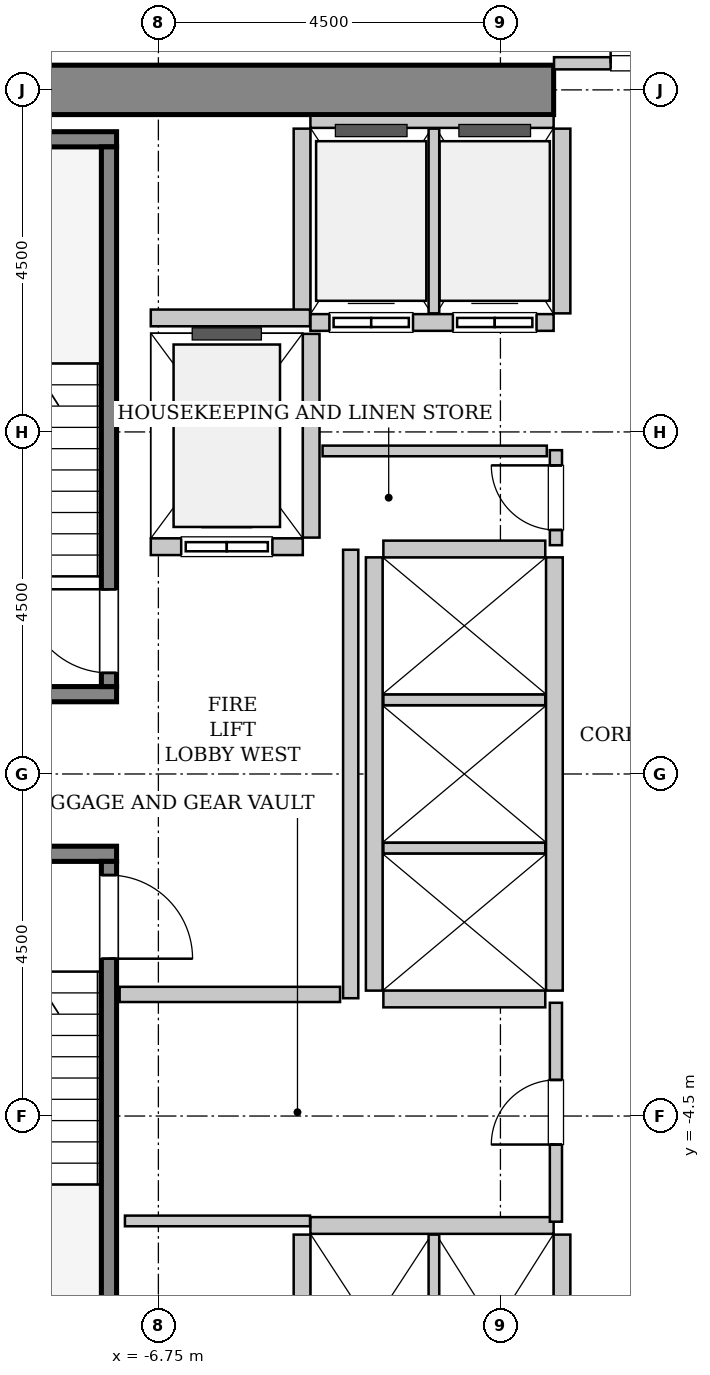
"""IFC4 building model, lengths in metres.
Left out: names, types, materials, properties, quantities, classifications, styles, units other than length and angle.
Written with IfcOpenShell. Run it as: python <this file> out.ifc"""

import sys

from ifc_helpers import new_model, si_unit, direction, frame, frame_2d, origin, place, context, subcontext, project, spatial, rectangle, extrude, source, transform, mapped, element, fill, save


model = new_model("IFC4")
c1 = context("Model", 3, precision=1e-05, world=origin(), true_north=direction((0.0, 1.0)))
c2 = subcontext(c1, "Body", "Model", "MODEL_VIEW")
j1 = project(units=[si_unit("LENGTHUNIT", "METRE"), si_unit("PLANEANGLEUNIT", "RADIAN")], contexts=[c1])
p1 = place(None, origin())
s1 = spatial("IfcSite", under=j1, at=p1, CompositionType="ELEMENT")
p2 = place(p1, origin())
s2 = spatial("IfcBuilding", under=s1, at=p2, CompositionType="ELEMENT")
p3 = place(p2, frame((0.0, 0.0, 33.0)))
s3 = spatial("IfcBuildingStorey", under=s2, at=p3, CompositionType="ELEMENT", Elevation=33.0)
m1 = source(origin(), c2, "Body", "SweptSolid", [
    extrude(rectangle(XDim=10.025, YDim=0.65, at=frame_2d((5.012, 0.0))), origin(), (0.0, 0.0, 1.0), 3.8),
])
p4 = place(p3, frame((-11.575, 9.0, 0.0), z_axis=(0.0, 0.0, 1.0), x_axis=(1.0, 0.0, 0.0)))
e1 = element("IfcWall", 1, at=p4, inside=s3, PredefinedType="SHEAR", context=c2, shape_type="MappedRepresentation", body=[
    mapped(m1, transform((0.0, 0.0, 0.0), x_axis=(1.0, 0.0, 0.0), y_axis=(0.0, 1.0, 0.0), z_axis=(0.0, 0.0, 1.0), scale=1.0)),
])
m2 = source(origin(), c2, "Body", "SweptSolid", [
    extrude(rectangle(XDim=3.4, YDim=0.2, at=frame_2d((1.7, 0.0))), origin(), (0.0, 0.0, 1.0), 3.8),
])
p5 = place(p3, frame((-7.3, 1.05, 0.0), z_axis=(0.0, 0.0, 1.0), x_axis=(-1.0, 0.0, 0.0)))
e2 = element("IfcWall", 2, at=p5, inside=s3, PredefinedType="SOLIDWALL", context=c2, shape_type="MappedRepresentation", body=[
    mapped(m2, transform((0.0, 0.0, 0.0), x_axis=(1.0, 0.0, 0.0), y_axis=(0.0, 1.0, 0.0), z_axis=(0.0, 0.0, 1.0), scale=1.0)),
])
m3 = source(origin(), c2, "Body", "SweptSolid", [
    extrude(rectangle(XDim=3.63, YDim=0.2, at=frame_2d((1.815, 0.0))), origin(), (0.0, 0.0, 1.0), 3.8),
])
p6 = place(p3, frame((-7.3, 8.35, 0.0), z_axis=(0.0, 0.0, 1.0), x_axis=(-1.0, 0.0, 0.0)))
e3 = element("IfcWall", 3, at=p6, inside=s3, PredefinedType="SOLIDWALL", context=c2, shape_type="MappedRepresentation", body=[
    mapped(m3, transform((0.0, 0.0, 0.0), x_axis=(1.0, 0.0, 0.0), y_axis=(0.0, 1.0, 0.0), z_axis=(0.0, 0.0, 1.0), scale=1.0)),
])
m4 = source(origin(), c2, "Body", "SweptSolid", [
    extrude(rectangle(XDim=7.1, YDim=0.2, at=frame_2d((3.55, 0.0))), origin(), (0.0, 0.0, 1.0), 3.8),
])
p7 = place(p3, frame((-7.4, 1.15, 0.0), z_axis=(0.0, 0.0, 1.0), x_axis=(0.0, 1.0, 0.0)))
e4 = element("IfcWall", 4, at=p7, inside=s3, PredefinedType="SOLIDWALL", context=c2, shape_type="MappedRepresentation", body=[
    mapped(m4, transform((0.0, 0.0, 0.0), x_axis=(1.0, 0.0, 0.0), y_axis=(0.0, 1.0, 0.0), z_axis=(0.0, 0.0, 1.0), scale=1.0)),
])
p8 = place(p7, frame((0.18, 0.0, 0.0)))
e5 = element("IfcOpeningElement", 5, at=p8, cuts=e4, PredefinedType="OPENING", context=c2, shape_type="SweptSolid", body=[
    extrude(rectangle(XDim=1.1, YDim=2.15, at=frame_2d((0.55, 1.075))), frame((0.0, 0.11, 0.0), z_axis=(0.0, -1.0, 0.0), x_axis=(1.0, 0.0, 0.0)), (0.0, 0.0, 1.0), 0.22),
])
p9 = place(p3, frame((-10.7, -1.05, 0.0), z_axis=(0.0, 0.0, 1.0), x_axis=(1.0, 0.0, 0.0)))
e6 = element("IfcWall", 6, at=p9, inside=s3, PredefinedType="SOLIDWALL", context=c2, shape_type="MappedRepresentation", body=[
    mapped(m2, transform((0.0, 0.0, 0.0), x_axis=(1.0, 0.0, 0.0), y_axis=(0.0, 1.0, 0.0), z_axis=(0.0, 0.0, 1.0), scale=1.0)),
])
p10 = place(p3, frame((-7.4, -1.15, 0.0), z_axis=(0.0, 0.0, 1.0), x_axis=(0.0, -1.0, 0.0)))
e7 = element("IfcWall", 7, at=p10, inside=s3, PredefinedType="SOLIDWALL", context=c2, shape_type="MappedRepresentation", body=[
    mapped(m4, transform((0.0, 0.0, 0.0), x_axis=(1.0, 0.0, 0.0), y_axis=(0.0, 1.0, 0.0), z_axis=(0.0, 0.0, 1.0), scale=1.0)),
])
p11 = place(p10, frame((0.18, 0.0, 0.0)))
e8 = element("IfcOpeningElement", 8, at=p11, cuts=e7, PredefinedType="OPENING", context=c2, shape_type="SweptSolid", body=[
    extrude(rectangle(XDim=1.1, YDim=2.15, at=frame_2d((0.55, 1.075))), frame((0.0, 0.11, 0.0), z_axis=(0.0, -1.0, 0.0), x_axis=(1.0, 0.0, 0.0)), (0.0, 0.0, 1.0), 0.22),
])
m5 = source(origin(), c2, "Body", "SweptSolid", [
    extrude(rectangle(XDim=2.0, YDim=0.22, at=frame_2d((1.0, 0.0))), origin(), (0.0, 0.0, 1.0), 3.535),
])
p12 = place(p3, frame((-6.85, 2.99, 0.0), z_axis=(0.0, 0.0, 1.0), x_axis=(1.0, 0.0, 0.0)))
e9 = element("IfcWall", 9, at=p12, inside=s3, PredefinedType="SOLIDWALL", context=c2, shape_type="MappedRepresentation", body=[
    mapped(m5, transform((0.0, 0.0, 0.0), x_axis=(1.0, 0.0, 0.0), y_axis=(0.0, 1.0, 0.0), z_axis=(0.0, 0.0, 1.0), scale=1.0)),
])
p13 = place(p12, frame((0.4, 0.0, 0.0)))
e10 = element("IfcOpeningElement", 10, at=p13, cuts=e9, PredefinedType="OPENING", context=c2, shape_type="SweptSolid", body=[
    extrude(rectangle(XDim=1.2, YDim=2.2, at=frame_2d((0.6, 1.1))), frame((0.0, 0.12, 0.0), z_axis=(0.0, -1.0, 0.0), x_axis=(1.0, 0.0, 0.0)), (0.0, 0.0, 1.0), 0.24),
])
m6 = source(origin(), c2, "Body", "SweptSolid", [
    extrude(rectangle(XDim=2.68, YDim=0.22, at=frame_2d((1.34, 0.0))), origin(), (0.0, 0.0, 1.0), 3.535),
])
p14 = place(p3, frame((-4.74, 3.11, 0.0), z_axis=(0.0, 0.0, 1.0), x_axis=(0.0, 1.0, 0.0)))
e11 = element("IfcWall", 11, at=p14, inside=s3, PredefinedType="SOLIDWALL", context=c2, shape_type="MappedRepresentation", body=[
    mapped(m6, transform((0.0, 0.0, 0.0), x_axis=(1.0, 0.0, 0.0), y_axis=(0.0, 1.0, 0.0), z_axis=(0.0, 0.0, 1.0), scale=1.0)),
])
m7 = source(origin(), c2, "Body", "SweptSolid", [
    extrude(rectangle(XDim=3.2, YDim=0.22, at=frame_2d((1.6, 0.0))), origin(), (0.0, 0.0, 1.0), 3.535),
])
p15 = place(p3, frame((-4.75, 5.94, 0.0), z_axis=(0.0, 0.0, 1.0), x_axis=(1.0, 0.0, 0.0)))
e12 = element("IfcWall", 12, at=p15, inside=s3, PredefinedType="SOLIDWALL", context=c2, shape_type="MappedRepresentation", body=[
    mapped(m7, transform((0.0, 0.0, 0.0), x_axis=(1.0, 0.0, 0.0), y_axis=(0.0, 1.0, 0.0), z_axis=(0.0, 0.0, 1.0), scale=1.0)),
])
p16 = place(p15, frame((0.25, 0.0, 0.0)))
e13 = element("IfcOpeningElement", 13, at=p16, cuts=e12, PredefinedType="OPENING", context=c2, shape_type="SweptSolid", body=[
    extrude(rectangle(XDim=1.1, YDim=2.2, at=frame_2d((0.55, 1.1))), frame((0.0, 0.12, 0.0), z_axis=(0.0, -1.0, 0.0), x_axis=(1.0, 0.0, 0.0)), (0.0, 0.0, 1.0), 0.24),
])
p17 = place(p15, frame((1.875, 0.0, 0.0)))
e14 = element("IfcOpeningElement", 14, at=p17, cuts=e12, PredefinedType="OPENING", context=c2, shape_type="SweptSolid", body=[
    extrude(rectangle(XDim=1.1, YDim=2.2, at=frame_2d((0.55, 1.1))), frame((0.0, 0.12, 0.0), z_axis=(0.0, -1.0, 0.0), x_axis=(1.0, 0.0, 0.0)), (0.0, 0.0, 1.0), 0.24),
])
m8 = source(origin(), c2, "Body", "SweptSolid", [
    extrude(rectangle(XDim=3.2, YDim=0.16, at=frame_2d((1.6, 0.0))), origin(), (0.0, 0.0, 1.0), 2.425),
])
p18 = place(p3, frame((-1.55, 8.58, 0.0), z_axis=(0.0, 0.0, 1.0), x_axis=(-1.0, 0.0, 0.0)))
e15 = element("IfcWall", 15, at=p18, inside=s3, PredefinedType="PARTITIONING", context=c2, shape_type="MappedRepresentation", body=[
    mapped(m8, transform((0.0, 0.0, 0.0), x_axis=(1.0, 0.0, 0.0), y_axis=(0.0, 1.0, 0.0), z_axis=(0.0, 0.0, 1.0), scale=1.0)),
])
m9 = source(origin(), c2, "Body", "SweptSolid", [
    extrude(rectangle(XDim=2.43, YDim=0.22, at=frame_2d((1.215, 0.0))), origin(), (0.0, 0.0, 1.0), 3.535),
])
p19 = place(p3, frame((-4.86, 8.49, 0.0), z_axis=(0.0, 0.0, 1.0), x_axis=(0.0, -1.0, 0.0)))
e16 = element("IfcWall", 16, at=p19, inside=s3, PredefinedType="SOLIDWALL", context=c2, shape_type="MappedRepresentation", body=[
    mapped(m9, transform((0.0, 0.0, 0.0), x_axis=(1.0, 0.0, 0.0), y_axis=(0.0, 1.0, 0.0), z_axis=(0.0, 0.0, 1.0), scale=1.0)),
])
m10 = source(origin(), c2, "Body", "SweptSolid", [
    extrude(rectangle(XDim=2.43, YDim=0.14, at=frame_2d((1.215, 0.0))), origin(), (0.0, 0.0, 1.0), 3.535),
])
p20 = place(p3, frame((-3.125, 6.06, 0.0), z_axis=(0.0, 0.0, 1.0), x_axis=(0.0, 1.0, 0.0)))
e17 = element("IfcWall", 17, at=p20, inside=s3, PredefinedType="PARTITIONING", context=c2, shape_type="MappedRepresentation", body=[
    mapped(m10, transform((0.0, 0.0, 0.0), x_axis=(1.0, 0.0, 0.0), y_axis=(0.0, 1.0, 0.0), z_axis=(0.0, 0.0, 1.0), scale=1.0)),
])
p21 = place(p3, frame((-1.44, 6.06, 0.0), z_axis=(0.0, 0.0, 1.0), x_axis=(0.0, 1.0, 0.0)))
e18 = element("IfcWall", 18, at=p21, inside=s3, PredefinedType="SOLIDWALL", context=c2, shape_type="MappedRepresentation", body=[
    mapped(m9, transform((0.0, 0.0, 0.0), x_axis=(1.0, 0.0, 0.0), y_axis=(0.0, 1.0, 0.0), z_axis=(0.0, 0.0, 1.0), scale=1.0)),
])
p22 = place(p3, frame((-1.55, -5.94, 0.0), z_axis=(0.0, 0.0, 1.0), x_axis=(-1.0, 0.0, 0.0)))
e19 = element("IfcWall", 19, at=p22, inside=s3, PredefinedType="SOLIDWALL", context=c2, shape_type="MappedRepresentation", body=[
    mapped(m7, transform((0.0, 0.0, 0.0), x_axis=(1.0, 0.0, 0.0), y_axis=(0.0, 1.0, 0.0), z_axis=(0.0, 0.0, 1.0), scale=1.0)),
])
p23 = place(p3, frame((-4.86, -6.06, 0.0), z_axis=(0.0, 0.0, 1.0), x_axis=(0.0, -1.0, 0.0)))
e20 = element("IfcWall", 20, at=p23, inside=s3, PredefinedType="SOLIDWALL", context=c2, shape_type="MappedRepresentation", body=[
    mapped(m9, transform((0.0, 0.0, 0.0), x_axis=(1.0, 0.0, 0.0), y_axis=(0.0, 1.0, 0.0), z_axis=(0.0, 0.0, 1.0), scale=1.0)),
])
p24 = place(p3, frame((-3.125, -8.49, 0.0), z_axis=(0.0, 0.0, 1.0), x_axis=(0.0, 1.0, 0.0)))
e21 = element("IfcWall", 21, at=p24, inside=s3, PredefinedType="PARTITIONING", context=c2, shape_type="MappedRepresentation", body=[
    mapped(m10, transform((0.0, 0.0, 0.0), x_axis=(1.0, 0.0, 0.0), y_axis=(0.0, 1.0, 0.0), z_axis=(0.0, 0.0, 1.0), scale=1.0)),
])
p25 = place(p3, frame((-1.44, -8.49, 0.0), z_axis=(0.0, 0.0, 1.0), x_axis=(0.0, 1.0, 0.0)))
e22 = element("IfcWall", 22, at=p25, inside=s3, PredefinedType="SOLIDWALL", context=c2, shape_type="MappedRepresentation", body=[
    mapped(m9, transform((0.0, 0.0, 0.0), x_axis=(1.0, 0.0, 0.0), y_axis=(0.0, 1.0, 0.0), z_axis=(0.0, 0.0, 1.0), scale=1.0)),
])
m11 = source(origin(), c2, "Body", "SweptSolid", [
    extrude(rectangle(XDim=5.7, YDim=0.22, at=frame_2d((2.85, 0.0))), origin(), (0.0, 0.0, 1.0), 3.535),
])
for number, where, z_axis, x_axis in (
    (23, (-1.54, -2.85, 0.0), (0.0, 0.0, 1.0), (0.0, 1.0, 0.0)),
    (24, (-3.91, 2.85, 0.0), (0.0, 0.0, 1.0), (0.0, -1.0, 0.0)),
):
    element("IfcWall", number, at=place(p3, frame(where, z_axis=z_axis, x_axis=x_axis)), inside=s3, PredefinedType="SOLIDWALL", context=c2, shape_type="MappedRepresentation", body=[
        mapped(m11, transform((0.0, 0.0, 0.0), x_axis=(1.0, 0.0, 0.0), y_axis=(0.0, 1.0, 0.0), z_axis=(0.0, 0.0, 1.0), scale=1.0)),
    ])
m12 = source(origin(), c2, "Body", "SweptSolid", [
    extrude(rectangle(XDim=2.13, YDim=0.22, at=frame_2d((1.065, 0.0))), origin(), (0.0, 0.0, 1.0), 3.535),
])
p26 = place(p3, frame((-3.79, -2.96, 0.0), z_axis=(0.0, 0.0, 1.0), x_axis=(1.0, 0.0, 0.0)))
e25 = element("IfcWall", 25, at=p26, inside=s3, PredefinedType="SOLIDWALL", context=c2, shape_type="MappedRepresentation", body=[
    mapped(m12, transform((0.0, 0.0, 0.0), x_axis=(1.0, 0.0, 0.0), y_axis=(0.0, 1.0, 0.0), z_axis=(0.0, 0.0, 1.0), scale=1.0)),
])
m13 = source(origin(), c2, "Body", "SweptSolid", [
    extrude(rectangle(XDim=2.13, YDim=0.14, at=frame_2d((1.065, 0.0))), origin(), (0.0, 0.0, 1.0), 3.535),
])
for number, where, z_axis, x_axis in (
    (26, (-3.79, -0.975, 0.0), (0.0, 0.0, 1.0), (1.0, 0.0, 0.0)),
    (27, (-3.79, 0.975, 0.0), (0.0, 0.0, 1.0), (1.0, 0.0, 0.0)),
):
    element("IfcWall", number, at=place(p3, frame(where, z_axis=z_axis, x_axis=x_axis)), inside=s3, PredefinedType="PARTITIONING", context=c2, shape_type="MappedRepresentation", body=[
        mapped(m13, transform((0.0, 0.0, 0.0), x_axis=(1.0, 0.0, 0.0), y_axis=(0.0, 1.0, 0.0), z_axis=(0.0, 0.0, 1.0), scale=1.0)),
    ])
p27 = place(p3, frame((-1.66, 2.96, 0.0), z_axis=(0.0, 0.0, 1.0), x_axis=(-1.0, 0.0, 0.0)))
e28 = element("IfcWall", 28, at=p27, inside=s3, PredefinedType="SOLIDWALL", context=c2, shape_type="MappedRepresentation", body=[
    mapped(m12, transform((0.0, 0.0, 0.0), x_axis=(1.0, 0.0, 0.0), y_axis=(0.0, 1.0, 0.0), z_axis=(0.0, 0.0, 1.0), scale=1.0)),
])
m14 = source(origin(), c2, "Body", "SweptSolid", [
    extrude(rectangle(XDim=2.095, YDim=0.22, at=frame_2d((1.048, 0.0))), origin(), (0.0, 0.0, 1.0), 3.535),
])
p28 = place(p3, frame((-6.85, 6.0, 0.0), z_axis=(0.0, 0.0, 1.0), x_axis=(1.0, 0.0, 0.0)))
e29 = element("IfcWall", 29, at=p28, inside=s3, PredefinedType="SOLIDWALL", context=c2, shape_type="MappedRepresentation", body=[
    mapped(m14, transform((0.0, 0.0, 0.0), x_axis=(1.0, 0.0, 0.0), y_axis=(0.0, 1.0, 0.0), z_axis=(0.0, 0.0, 1.0), scale=1.0)),
])
m15 = source(origin(), c2, "Body", "SweptSolid", [
    extrude(rectangle(XDim=5.9, YDim=0.2, at=frame_2d((2.95, 0.0))), origin(), (0.0, 0.0, 1.0), 3.535),
])
p29 = place(p3, frame((-4.22, -2.95, 0.0), z_axis=(0.0, 0.0, 1.0), x_axis=(0.0, 1.0, 0.0)))
e30 = element("IfcWall", 30, at=p29, inside=s3, PredefinedType="PARTITIONING", context=c2, shape_type="MappedRepresentation", body=[
    mapped(m15, transform((0.0, 0.0, 0.0), x_axis=(1.0, 0.0, 0.0), y_axis=(0.0, 1.0, 0.0), z_axis=(0.0, 0.0, 1.0), scale=1.0)),
])
m16 = source(origin(), c2, "Body", "SweptSolid", [
    extrude(rectangle(XDim=2.9, YDim=0.2, at=frame_2d((1.45, 0.0))), origin(), (0.0, 0.0, 1.0), 3.535),
])
p30 = place(p3, frame((-7.26, -2.9, 0.0), z_axis=(0.0, 0.0, 1.0), x_axis=(1.0, 0.0, 0.0)))
e31 = element("IfcWall", 31, at=p30, inside=s3, PredefinedType="PARTITIONING", context=c2, shape_type="MappedRepresentation", body=[
    mapped(m16, transform((0.0, 0.0, 0.0), x_axis=(1.0, 0.0, 0.0), y_axis=(0.0, 1.0, 0.0), z_axis=(0.0, 0.0, 1.0), scale=1.0)),
])
m17 = source(origin(), c2, "Body", "SweptSolid", [
    extrude(rectangle(XDim=3.09, YDim=0.16, at=frame_2d((1.545, 0.0))), origin(), (0.0, 0.0, 1.0), 2.425),
])
p31 = place(p3, frame((-1.545, 9.35, 0.0), z_axis=(0.0, 0.0, 1.0), x_axis=(1.0, 0.0, 0.0)))
e32 = element("IfcWall", 32, at=p31, inside=s3, PredefinedType="PARTITIONING", context=c2, shape_type="MappedRepresentation", body=[
    mapped(m17, transform((0.0, 0.0, 0.0), x_axis=(1.0, 0.0, 0.0), y_axis=(0.0, 1.0, 0.0), z_axis=(0.0, 0.0, 1.0), scale=1.0)),
])
p32 = place(p31, frame((0.745, 0.0, 0.0)))
e33 = element("IfcOpeningElement", 33, at=p32, cuts=e32, PredefinedType="OPENING", context=c2, shape_type="SweptSolid", body=[
    extrude(rectangle(XDim=1.6, YDim=2.3, at=frame_2d((0.8, 1.15))), frame((0.0, 0.09, 0.0), z_axis=(0.0, -1.0, 0.0), x_axis=(1.0, 0.0, 0.0)), (0.0, 0.0, 1.0), 0.18),
])
m18 = source(origin(), c2, "Body", "SweptSolid", [
    extrude(rectangle(XDim=1.25, YDim=0.16, at=frame_2d((0.625, 0.0))), origin(), (0.0, 0.0, 1.0), 3.535),
])
p33 = place(p3, frame((-1.52, 3.01, 0.0), z_axis=(0.0, 0.0, 1.0), x_axis=(0.0, 1.0, 0.0)))
e34 = element("IfcWall", 34, at=p33, inside=s3, PredefinedType="PARTITIONING", context=c2, shape_type="MappedRepresentation", body=[
    mapped(m18, transform((0.0, 0.0, 0.0), x_axis=(1.0, 0.0, 0.0), y_axis=(0.0, 1.0, 0.0), z_axis=(0.0, 0.0, 1.0), scale=1.0)),
])
p34 = place(p33, frame((0.2, 0.0, 0.0)))
e35 = element("IfcOpeningElement", 35, at=p34, cuts=e34, PredefinedType="OPENING", context=c2, shape_type="SweptSolid", body=[
    extrude(rectangle(XDim=0.85, YDim=2.1, at=frame_2d((0.425, 1.05))), frame((0.0, 0.09, 0.0), z_axis=(0.0, -1.0, 0.0), x_axis=(1.0, 0.0, 0.0)), (0.0, 0.0, 1.0), 0.18),
])
m19 = source(origin(), c2, "Body", "SweptSolid", [
    extrude(rectangle(XDim=2.95, YDim=0.14, at=frame_2d((1.475, 0.0))), origin(), (0.0, 0.0, 1.0), 3.535),
])
p35 = place(p3, frame((-4.59, 4.25, 0.0), z_axis=(0.0, 0.0, 1.0), x_axis=(1.0, 0.0, 0.0)))
e36 = element("IfcWall", 36, at=p35, inside=s3, PredefinedType="PARTITIONING", context=c2, shape_type="MappedRepresentation", body=[
    mapped(m19, transform((0.0, 0.0, 0.0), x_axis=(1.0, 0.0, 0.0), y_axis=(0.0, 1.0, 0.0), z_axis=(0.0, 0.0, 1.0), scale=1.0)),
])
m20 = source(origin(), c2, "Body", "SweptSolid", [
    extrude(rectangle(XDim=2.88, YDim=0.16, at=frame_2d((1.44, 0.0))), origin(), (0.0, 0.0, 1.0), 3.535),
])
p36 = place(p3, frame((-1.52, -5.89, 0.0), z_axis=(0.0, 0.0, 1.0), x_axis=(0.0, 1.0, 0.0)))
e37 = element("IfcWall", 37, at=p36, inside=s3, PredefinedType="PARTITIONING", context=c2, shape_type="MappedRepresentation", body=[
    mapped(m20, transform((0.0, 0.0, 0.0), x_axis=(1.0, 0.0, 0.0), y_axis=(0.0, 1.0, 0.0), z_axis=(0.0, 0.0, 1.0), scale=1.0)),
])
p37 = place(p36, frame((1.015, 0.0, 0.0)))
e38 = element("IfcOpeningElement", 38, at=p37, cuts=e37, PredefinedType="OPENING", context=c2, shape_type="SweptSolid", body=[
    extrude(rectangle(XDim=0.85, YDim=2.1, at=frame_2d((0.425, 1.05))), frame((0.0, 0.09, 0.0), z_axis=(0.0, -1.0, 0.0), x_axis=(1.0, 0.0, 0.0)), (0.0, 0.0, 1.0), 0.18),
])
m21 = source(origin(), c2, "Body", "SweptSolid", [
    extrude(rectangle(XDim=2.435, YDim=0.14, at=frame_2d((1.218, 0.0))), origin(), (0.0, 0.0, 1.0), 3.535),
])
p38 = place(p3, frame((-7.19, -5.88, 0.0), z_axis=(0.0, 0.0, 1.0), x_axis=(1.0, 0.0, 0.0)))
e39 = element("IfcWall", 39, at=p38, inside=s3, PredefinedType="PARTITIONING", context=c2, shape_type="MappedRepresentation", body=[
    mapped(m21, transform((0.0, 0.0, 0.0), x_axis=(1.0, 0.0, 0.0), y_axis=(0.0, 1.0, 0.0), z_axis=(0.0, 0.0, 1.0), scale=1.0)),
])
m22 = source(origin(), c2, "Body", "SweptSolid", [
    extrude(rectangle(XDim=1.1, YDim=2.15, at=frame_2d((0.55, 1.075))), frame((0.0, 0.025, 0.0), z_axis=(0.0, -1.0, 0.0), x_axis=(1.0, 0.0, 0.0)), (0.0, 0.0, 1.0), 0.05),
])
p39 = place(p8, origin())
e40 = element("IfcDoor", 40, at=p39, inside=s3, OperationType="SINGLE_SWING_RIGHT", PredefinedType="DOOR", context=c2, shape_type="MappedRepresentation", body=[
    mapped(m22, transform((0.0, 0.0, 0.0), x_axis=(1.0, 0.0, 0.0), y_axis=(0.0, 1.0, 0.0), z_axis=(0.0, 0.0, 1.0), scale=1.0)),
])
fill(e5, e40)
p40 = place(p11, origin())
e41 = element("IfcDoor", 41, at=p40, inside=s3, OperationType="SINGLE_SWING_RIGHT", PredefinedType="DOOR", context=c2, shape_type="MappedRepresentation", body=[
    mapped(m22, transform((0.0, 0.0, 0.0), x_axis=(1.0, 0.0, 0.0), y_axis=(0.0, 1.0, 0.0), z_axis=(0.0, 0.0, 1.0), scale=1.0)),
])
fill(e8, e41)
m23 = source(origin(), c2, "Body", "SweptSolid", [
    extrude(rectangle(XDim=1.2, YDim=2.2, at=frame_2d((0.6, 1.1))), frame((0.0, 0.025, 0.0), z_axis=(0.0, -1.0, 0.0), x_axis=(1.0, 0.0, 0.0)), (0.0, 0.0, 1.0), 0.05),
])
p41 = place(p13, origin())
e42 = element("IfcDoor", 42, at=p41, inside=s3, OperationType="SLIDING_TO_LEFT", PredefinedType="DOOR", context=c2, shape_type="MappedRepresentation", body=[
    mapped(m23, transform((0.0, 0.0, 0.0), x_axis=(1.0, 0.0, 0.0), y_axis=(0.0, 1.0, 0.0), z_axis=(0.0, 0.0, 1.0), scale=1.0)),
])
fill(e10, e42)
m24 = source(origin(), c2, "Body", "SweptSolid", [
    extrude(rectangle(XDim=1.1, YDim=2.2, at=frame_2d((0.55, 1.1))), frame((0.0, 0.025, 0.0), z_axis=(0.0, -1.0, 0.0), x_axis=(1.0, 0.0, 0.0)), (0.0, 0.0, 1.0), 0.05),
])
p42 = place(p16, origin())
e43 = element("IfcDoor", 43, at=p42, inside=s3, OperationType="DOUBLE_DOOR_SLIDING", PredefinedType="DOOR", context=c2, shape_type="MappedRepresentation", body=[
    mapped(m24, transform((0.0, 0.0, 0.0), x_axis=(1.0, 0.0, 0.0), y_axis=(0.0, 1.0, 0.0), z_axis=(0.0, 0.0, 1.0), scale=1.0)),
])
fill(e13, e43)
p43 = place(p17, origin())
e44 = element("IfcDoor", 44, at=p43, inside=s3, OperationType="DOUBLE_DOOR_SLIDING", PredefinedType="DOOR", context=c2, shape_type="MappedRepresentation", body=[
    mapped(m24, transform((0.0, 0.0, 0.0), x_axis=(1.0, 0.0, 0.0), y_axis=(0.0, 1.0, 0.0), z_axis=(0.0, 0.0, 1.0), scale=1.0)),
])
fill(e14, e44)
m25 = source(origin(), c2, "Body", "SweptSolid", [
    extrude(rectangle(XDim=1.6, YDim=2.3, at=frame_2d((0.8, 1.15))), frame((0.0, 0.025, 0.0), z_axis=(0.0, -1.0, 0.0), x_axis=(1.0, 0.0, 0.0)), (0.0, 0.0, 1.0), 0.05),
])
p44 = place(p32, origin())
e45 = element("IfcDoor", 45, at=p44, inside=s3, OperationType="DOUBLE_DOOR_SINGLE_SWING", PredefinedType="DOOR", context=c2, shape_type="MappedRepresentation", body=[
    mapped(m25, transform((0.0, 0.0, 0.0), x_axis=(1.0, 0.0, 0.0), y_axis=(0.0, 1.0, 0.0), z_axis=(0.0, 0.0, 1.0), scale=1.0)),
])
fill(e33, e45)
m26 = source(origin(), c2, "Body", "SweptSolid", [
    extrude(rectangle(XDim=0.85, YDim=2.1, at=frame_2d((0.425, 1.05))), frame((0.0, 0.025, 0.0), z_axis=(0.0, -1.0, 0.0), x_axis=(1.0, 0.0, 0.0)), (0.0, 0.0, 1.0), 0.05),
])
p45 = place(p34, origin())
e46 = element("IfcDoor", 46, at=p45, inside=s3, OperationType="SINGLE_SWING_RIGHT", PredefinedType="DOOR", context=c2, shape_type="MappedRepresentation", body=[
    mapped(m26, transform((0.0, 0.0, 0.0), x_axis=(1.0, 0.0, 0.0), y_axis=(0.0, 1.0, 0.0), z_axis=(0.0, 0.0, 1.0), scale=1.0)),
])
fill(e35, e46)
p46 = place(p37, origin())
e47 = element("IfcDoor", 47, at=p46, inside=s3, OperationType="SINGLE_SWING_LEFT", PredefinedType="DOOR", context=c2, shape_type="MappedRepresentation", body=[
    mapped(m26, transform((0.0, 0.0, 0.0), x_axis=(1.0, 0.0, 0.0), y_axis=(0.0, 1.0, 0.0), z_axis=(0.0, 0.0, 1.0), scale=1.0)),
])
fill(e38, e47)
save(model, sys.argv[1])
